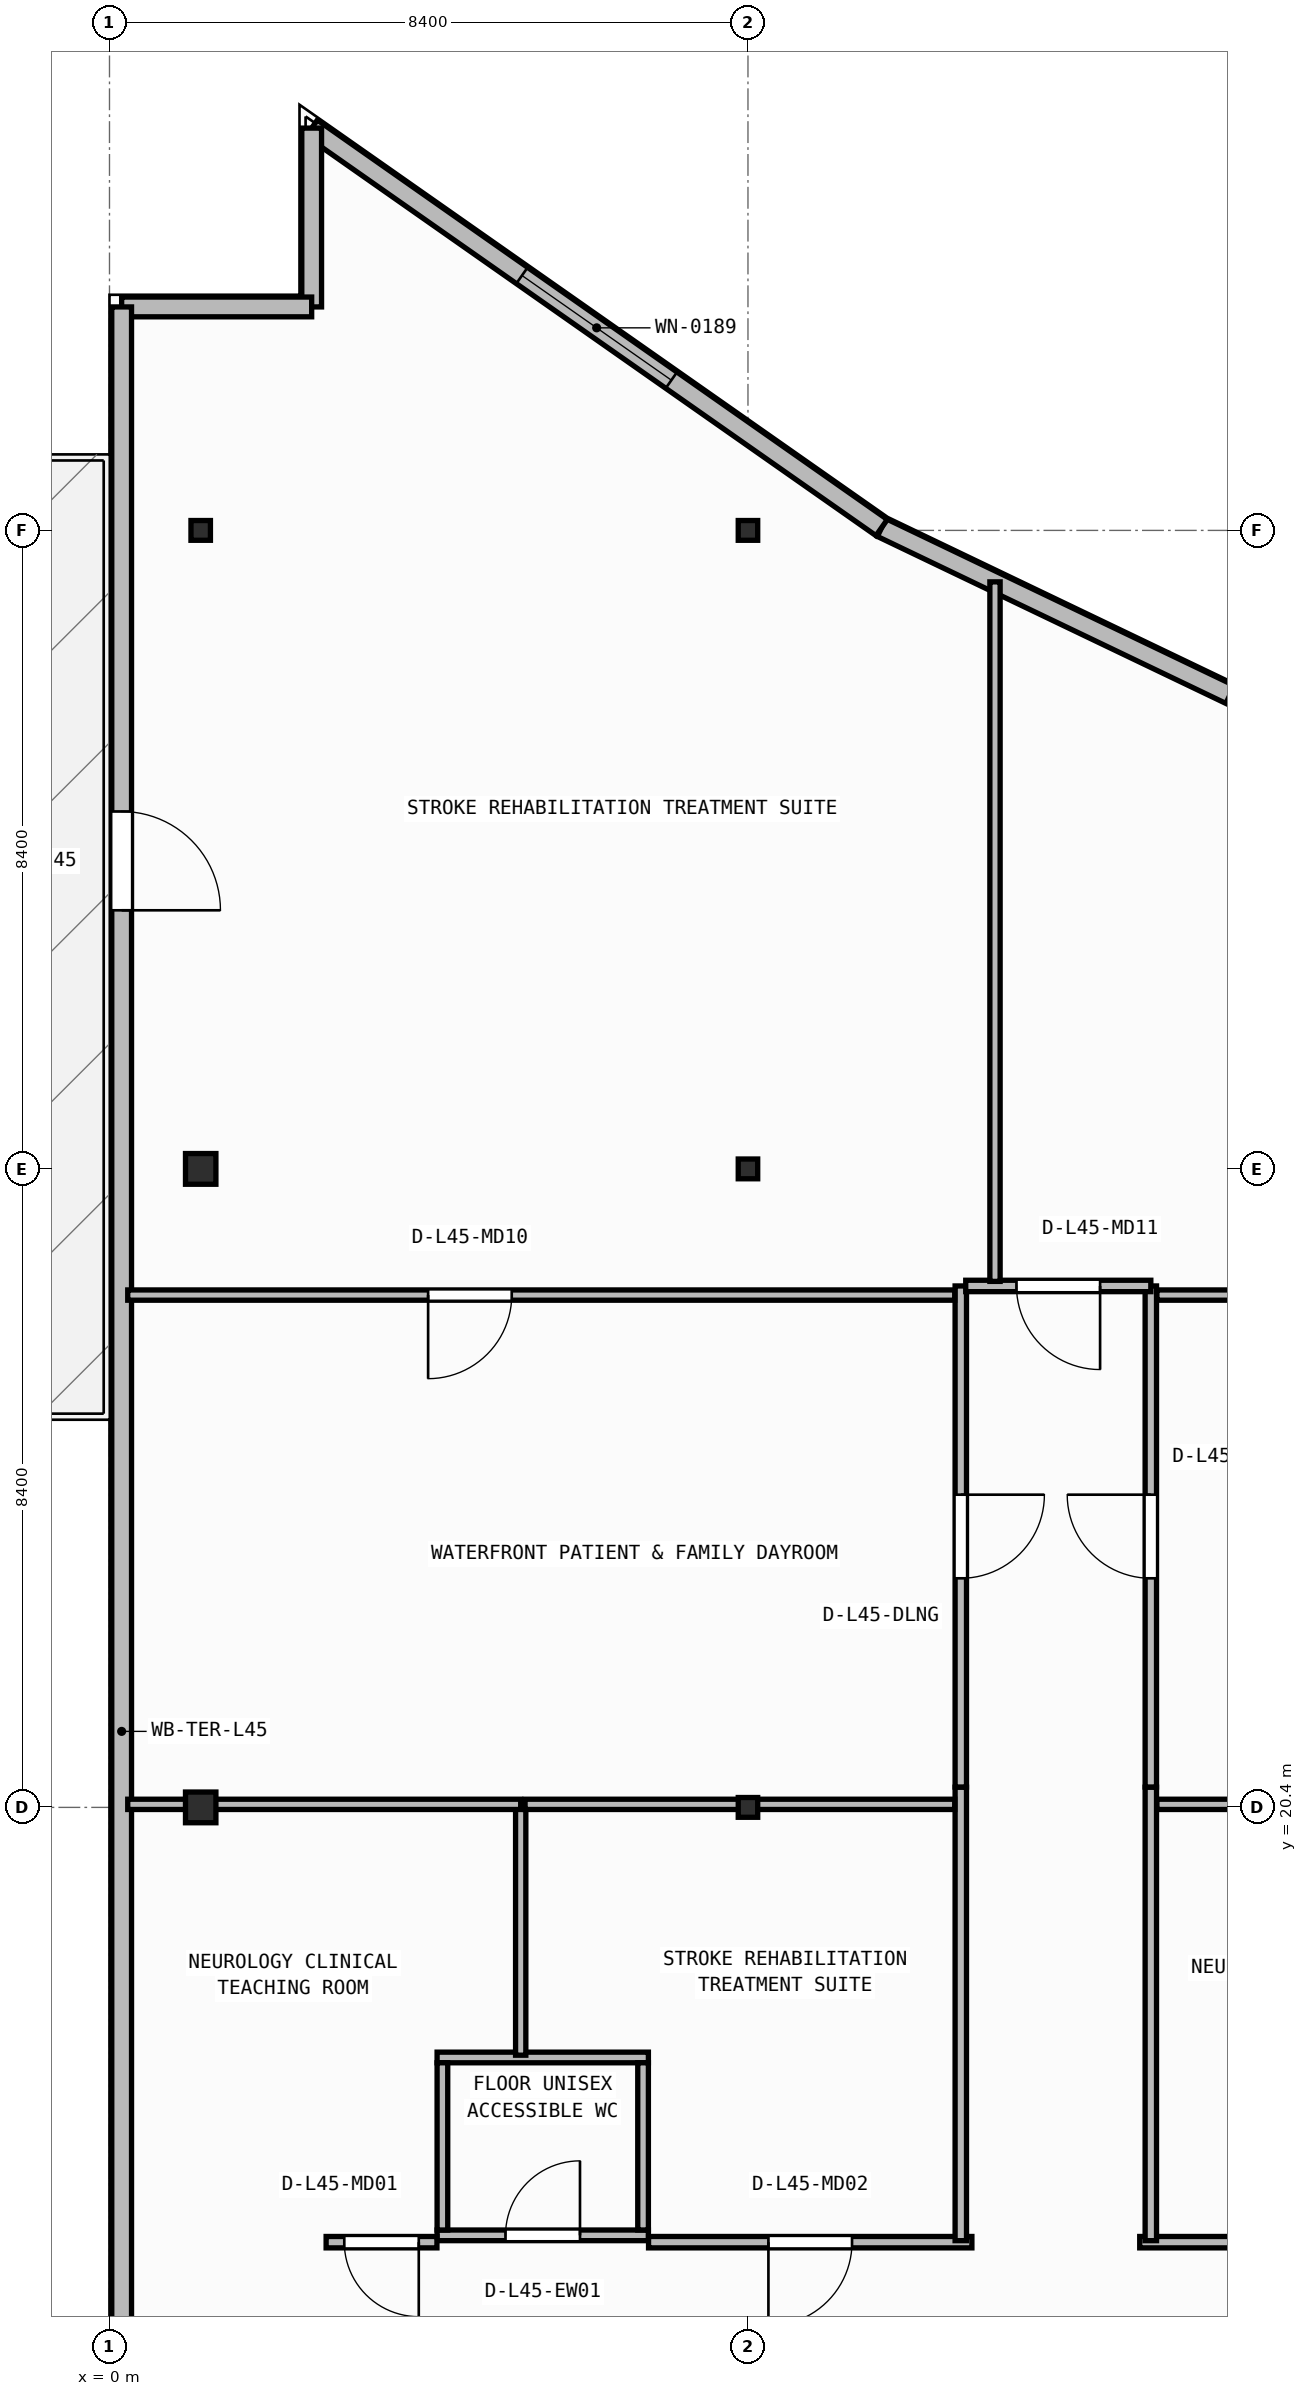
"""IFC4 building model, lengths in metres.
Left out: names, types, materials, properties, quantities, classifications, styles, units other than length and angle.
Written with IfcOpenShell. Run it as: python <this file> out.ifc"""

import sys

from ifc_helpers import new_model, si_unit, direction, frame, frame_2d, origin, origin_2d, place, context, subcontext, project, spatial, rectangle, i_section, extrude, element, fill, save


model = new_model("IFC4")
c1 = context("Model", 3, precision=1e-05, world=origin(), true_north=direction((0.0, 1.0)))
c2 = subcontext(c1, "Body", "Model", "MODEL_VIEW")
j1 = project(units=[si_unit("LENGTHUNIT", "METRE"), si_unit("PLANEANGLEUNIT", "RADIAN")], contexts=[c1])
p1 = place(None, origin())
s1 = spatial("IfcSite", under=j1, at=p1, CompositionType="ELEMENT")
p2 = place(p1, origin())
s2 = spatial("IfcBuilding", under=s1, at=p2, CompositionType="ELEMENT")
p3 = place(p2, frame((0.0, 0.0, 184.2)))
s3 = spatial("IfcBuildingStorey", under=s2, at=p3, CompositionType="ELEMENT", Elevation=184.2)
p4 = place(p3, frame((1.2, 20.4, 0.0), z_axis=(0.0, 0.0, 1.0), x_axis=(1.0, 0.0, 0.0)))
e1 = element("IfcColumn", 1, at=p4, inside=s3, PredefinedType="COLUMN", context=c2, shape_type="SweptSolid", body=[
    extrude(i_section(OverallWidth=0.4, OverallDepth=0.404, WebThickness=0.02, FlangeThickness=0.032, at=origin_2d()), origin(), (0.0, 0.0, 1.0), 3.95),
])
p5 = place(p3, frame((8.4, 20.4, 0.0), z_axis=(0.0, 0.0, 1.0), x_axis=(1.0, 0.0, 0.0)))
e2 = element("IfcColumn", 2, at=p5, inside=s3, PredefinedType="COLUMN", context=c2, shape_type="SweptSolid", body=[
    extrude(i_section(OverallWidth=0.256, OverallDepth=0.26, WebThickness=0.01, FlangeThickness=0.017, FilletRadius=0.013, at=origin_2d()), origin(), (0.0, 0.0, 1.0), 3.95),
])
p6 = place(p3, frame((1.2, 28.8, 0.0), z_axis=(0.0, 0.0, 1.0), x_axis=(1.0, 0.0, 0.0)))
e3 = element("IfcColumn", 3, at=p6, inside=s3, PredefinedType="COLUMN", context=c2, shape_type="SweptSolid", body=[
    extrude(i_section(OverallWidth=0.4, OverallDepth=0.404, WebThickness=0.02, FlangeThickness=0.032, at=origin_2d()), origin(), (0.0, 0.0, 1.0), 3.95),
])
for number, where, z_axis, x_axis in (
    (4, (8.4, 28.8, 0.0), (0.0, 0.0, 1.0), (1.0, 0.0, 0.0)),
    (5, (1.2, 37.2, 0.0), (0.0, 0.0, 1.0), (1.0, 0.0, 0.0)),
    (6, (8.4, 37.2, 0.0), (0.0, 0.0, 1.0), (1.0, 0.0, 0.0)),
):
    element("IfcColumn", number, at=place(p3, frame(where, z_axis=z_axis, x_axis=x_axis)), inside=s3, PredefinedType="COLUMN", context=c2, shape_type="SweptSolid", body=[
        extrude(i_section(OverallWidth=0.256, OverallDepth=0.26, WebThickness=0.01, FlangeThickness=0.017, FilletRadius=0.013, at=origin_2d()), origin(), (0.0, 0.0, 1.0), 3.95),
    ])
p7 = place(p3, frame((21.461, 31.823, 0.0), z_axis=(0.0, 0.0, 1.0), x_axis=(-0.901858094827, 0.432032379336, 0.0)))
e7 = element("IfcWall", 7, at=p7, inside=s3, PredefinedType="STANDARD", context=c2, shape_type="SweptSolid", body=[
    extrude(rectangle(XDim=12.532, YDim=0.26, at=frame_2d((6.266, 0.0))), origin(), (0.0, 0.0, 1.0), 3.71),
])
p8 = place(p7, frame((5.066, 0.0, 0.9)))
e8 = element("IfcOpeningElement", 8, at=p8, cuts=e7, PredefinedType="OPENING", context=c2, shape_type="SweptSolid", body=[
    extrude(rectangle(XDim=2.4, YDim=1.65, at=frame_2d((1.2, 0.825))), frame((0.0, 0.14, 0.0), z_axis=(0.0, -1.0, 0.0), x_axis=(1.0, 0.0, 0.0)), (0.0, 0.0, 1.0), 0.28),
])
p9 = place(p3, frame((10.159, 37.237, 0.0), z_axis=(0.0, 0.0, 1.0), x_axis=(-0.818933702389, 0.57388813465, 0.0)))
e9 = element("IfcWall", 9, at=p9, inside=s3, PredefinedType="STANDARD", context=c2, shape_type="SweptSolid", body=[
    extrude(rectangle(XDim=9.157, YDim=0.26, at=frame_2d((4.579, 0.0))), origin(), (0.0, 0.0, 1.0), 3.71),
])
p10 = place(p9, frame((3.378, 0.0, 0.9)))
e10 = element("IfcOpeningElement", 10, at=p10, cuts=e9, PredefinedType="OPENING", context=c2, shape_type="SweptSolid", body=[
    extrude(rectangle(XDim=2.4, YDim=1.65, at=frame_2d((1.2, 0.825))), frame((0.0, 0.14, 0.0), z_axis=(0.0, -1.0, 0.0), x_axis=(1.0, 0.0, 0.0)), (0.0, 0.0, 1.0), 0.28),
])
p11 = place(p3, frame((2.66, 42.492, 0.0), z_axis=(0.0, 0.0, 1.0), x_axis=(0.0, -1.0, 0.0)))
e11 = element("IfcWall", 11, at=p11, inside=s3, PredefinedType="STANDARD", context=c2, shape_type="SweptSolid", body=[
    extrude(rectangle(XDim=2.353, YDim=0.26, at=frame_2d((1.176, 0.0))), origin(), (0.0, 0.0, 1.0), 3.71),
])
p12 = place(p3, frame((2.66, 40.14, 0.0), z_axis=(0.0, 0.0, 1.0), x_axis=(-1.0, 0.0, 0.0)))
e12 = element("IfcWall", 12, at=p12, inside=s3, PredefinedType="STANDARD", context=c2, shape_type="SweptSolid", body=[
    extrude(rectangle(XDim=2.5, YDim=0.26, at=frame_2d((1.25, 0.0))), origin(), (0.0, 0.0, 1.0), 3.71),
])
p13 = place(p3, frame((0.16, 40.14, 0.0), z_axis=(0.0, 0.0, 1.0), x_axis=(0.0, -1.0, 0.0)))
e13 = element("IfcWall", 13, at=p13, inside=s3, PredefinedType="STANDARD", context=c2, shape_type="SweptSolid", body=[
    extrude(rectangle(XDim=37.48, YDim=0.26, at=frame_2d((18.74, 0.0))), origin(), (0.0, 0.0, 1.0), 3.71),
])
p14 = place(p13, frame((6.638, 0.0, 0.0)))
e14 = element("IfcOpeningElement", 14, at=p14, cuts=e13, PredefinedType="OPENING", context=c2, shape_type="SweptSolid", body=[
    extrude(rectangle(XDim=1.3, YDim=2.15, at=frame_2d((0.65, 1.075))), frame((0.0, 0.14, 0.0), z_axis=(0.0, -1.0, 0.0), x_axis=(1.0, 0.0, 0.0)), (0.0, 0.0, 1.0), 0.28),
])
p15 = place(p3, frame((4.31, 14.77, 0.0), z_axis=(0.0, 0.0, 1.0), x_axis=(1.0, 0.0, 0.0)))
e15 = element("IfcWall", 15, at=p15, inside=s3, PredefinedType="PARTITIONING", context=c2, shape_type="SweptSolid", body=[
    extrude(rectangle(XDim=2.78, YDim=0.14, at=frame_2d((1.39, 0.0))), origin(), (0.0, 0.0, 1.0), 3.71),
])
p16 = place(p15, frame((0.9, 0.0, 0.0)))
e16 = element("IfcOpeningElement", 16, at=p16, cuts=e15, PredefinedType="OPENING", context=c2, shape_type="SweptSolid", body=[
    extrude(rectangle(XDim=0.98, YDim=2.1, at=frame_2d((0.49, 1.05))), frame((0.0, 0.08, 0.0), z_axis=(0.0, -1.0, 0.0), x_axis=(1.0, 0.0, 0.0)), (0.0, 0.0, 1.0), 0.16),
])
p17 = place(p3, frame((4.31, 17.11, 0.0), z_axis=(0.0, 0.0, 1.0), x_axis=(1.0, 0.0, 0.0)))
e17 = element("IfcWall", 17, at=p17, inside=s3, PredefinedType="PARTITIONING", context=c2, shape_type="SweptSolid", body=[
    extrude(rectangle(XDim=2.78, YDim=0.14, at=frame_2d((1.39, 0.0))), origin(), (0.0, 0.0, 1.0), 3.71),
])
for number, where, z_axis, x_axis in (
    (18, (4.38, 14.84, 0.0), (0.0, 0.0, 1.0), (0.0, 1.0, 0.0)),
    (19, (7.02, 14.84, 0.0), (0.0, 0.0, 1.0), (0.0, 1.0, 0.0)),
):
    element("IfcWall", number, at=place(p3, frame(where, z_axis=z_axis, x_axis=x_axis)), inside=s3, PredefinedType="PARTITIONING", context=c2, shape_type="SweptSolid", body=[
        extrude(rectangle(XDim=2.2, YDim=0.14, at=frame_2d((1.1, 0.0))), origin(), (0.0, 0.0, 1.0), 3.71),
    ])
p18 = place(p3, frame((4.308, 14.68, 0.0), z_axis=(0.0, 0.0, 1.0), x_axis=(-1.0, 0.0, 0.0)))
e20 = element("IfcWall", 20, at=p18, inside=s3, PredefinedType="PARTITIONING", context=c2, shape_type="SweptSolid", body=[
    extrude(rectangle(XDim=1.458, YDim=0.15, at=frame_2d((0.729, 0.0))), origin(), (0.0, 0.0, 1.0), 3.71),
])
p19 = place(p18, frame((0.239, 0.0, 0.0)))
e21 = element("IfcOpeningElement", 21, at=p19, cuts=e20, PredefinedType="OPENING", context=c2, shape_type="SweptSolid", body=[
    extrude(rectangle(XDim=0.98, YDim=2.1, at=frame_2d((0.49, 1.05))), frame((0.0, 0.085, 0.0), z_axis=(0.0, -1.0, 0.0), x_axis=(1.0, 0.0, 0.0)), (0.0, 0.0, 1.0), 0.17),
])
p20 = place(p3, frame((11.346, 14.68, 0.0), z_axis=(0.0, 0.0, 1.0), x_axis=(-1.0, 0.0, 0.0)))
e22 = element("IfcWall", 22, at=p20, inside=s3, PredefinedType="PARTITIONING", context=c2, shape_type="SweptSolid", body=[
    extrude(rectangle(XDim=4.254, YDim=0.15, at=frame_2d((2.127, 0.0))), origin(), (0.0, 0.0, 1.0), 3.71),
])
p21 = place(p20, frame((1.577, 0.0, 0.0)))
e23 = element("IfcOpeningElement", 23, at=p21, cuts=e22, PredefinedType="OPENING", context=c2, shape_type="SweptSolid", body=[
    extrude(rectangle(XDim=1.1, YDim=2.1, at=frame_2d((0.55, 1.05))), frame((0.0, 0.085, 0.0), z_axis=(0.0, -1.0, 0.0), x_axis=(1.0, 0.0, 0.0)), (0.0, 0.0, 1.0), 0.17),
])
p22 = place(p3, frame((18.266, 14.68, 0.0), z_axis=(0.0, 0.0, 1.0), x_axis=(-1.0, 0.0, 0.0)))
e24 = element("IfcWall", 24, at=p22, inside=s3, PredefinedType="PARTITIONING", context=c2, shape_type="SweptSolid", body=[
    extrude(rectangle(XDim=4.712, YDim=0.15, at=frame_2d((2.356, 0.0))), origin(), (0.0, 0.0, 1.0), 3.71),
])
p23 = place(p22, frame((1.806, 0.0, 0.0)))
e25 = element("IfcOpeningElement", 25, at=p23, cuts=e24, PredefinedType="OPENING", context=c2, shape_type="SweptSolid", body=[
    extrude(rectangle(XDim=1.1, YDim=2.1, at=frame_2d((0.55, 1.05))), frame((0.0, 0.085, 0.0), z_axis=(0.0, -1.0, 0.0), x_axis=(1.0, 0.0, 0.0)), (0.0, 0.0, 1.0), 0.17),
])
for number, where, z_axis, x_axis in (
    (26, (11.2, 20.666, 0.0), (0.0, 0.0, 1.0), (0.0, -1.0, 0.0)),
    (27, (13.7, 14.7, 0.0), (0.0, 0.0, 1.0), (0.0, 1.0, 0.0)),
):
    element("IfcWall", number, at=place(p3, frame(where, z_axis=z_axis, x_axis=x_axis)), inside=s3, PredefinedType="PARTITIONING", context=c2, shape_type="SweptSolid", body=[
        extrude(rectangle(XDim=5.966, YDim=0.15, at=frame_2d((2.983, 0.0))), origin(), (0.0, 0.0, 1.0), 3.71),
    ])
p24 = place(p3, frame((11.2, 27.26, 0.0), z_axis=(0.0, 0.0, 1.0), x_axis=(0.0, -1.0, 0.0)))
e28 = element("IfcWall", 28, at=p24, inside=s3, PredefinedType="PARTITIONING", context=c2, shape_type="SweptSolid", body=[
    extrude(rectangle(XDim=6.592, YDim=0.15, at=frame_2d((3.296, 0.0))), origin(), (0.0, 0.0, 1.0), 3.71),
])
p25 = place(p24, frame((2.746, 0.0, 0.0)))
e29 = element("IfcOpeningElement", 29, at=p25, cuts=e28, PredefinedType="OPENING", context=c2, shape_type="SweptSolid", body=[
    extrude(rectangle(XDim=1.1, YDim=2.1, at=frame_2d((0.55, 1.05))), frame((0.0, 0.085, 0.0), z_axis=(0.0, -1.0, 0.0), x_axis=(1.0, 0.0, 0.0)), (0.0, 0.0, 1.0), 0.17),
])
p26 = place(p3, frame((13.7, 20.668, 0.0), z_axis=(0.0, 0.0, 1.0), x_axis=(0.0, 1.0, 0.0)))
e30 = element("IfcWall", 30, at=p26, inside=s3, PredefinedType="PARTITIONING", context=c2, shape_type="SweptSolid", body=[
    extrude(rectangle(XDim=6.592, YDim=0.15, at=frame_2d((3.296, 0.0))), origin(), (0.0, 0.0, 1.0), 3.71),
])
p27 = place(p26, frame((2.746, 0.0, 0.0)))
e31 = element("IfcOpeningElement", 31, at=p27, cuts=e30, PredefinedType="OPENING", context=c2, shape_type="SweptSolid", body=[
    extrude(rectangle(XDim=1.1, YDim=2.1, at=frame_2d((0.55, 1.05))), frame((0.0, 0.085, 0.0), z_axis=(0.0, -1.0, 0.0), x_axis=(1.0, 0.0, 0.0)), (0.0, 0.0, 1.0), 0.17),
])
p28 = place(p3, frame((13.7, 27.26, 0.0), z_axis=(0.0, 0.0, 1.0), x_axis=(-1.0, 0.0, 0.0)))
e32 = element("IfcWall", 32, at=p28, inside=s3, PredefinedType="PARTITIONING", context=c2, shape_type="SweptSolid", body=[
    extrude(rectangle(XDim=2.435, YDim=0.15, at=frame_2d((1.218, 0.0))), origin(), (0.0, 0.0, 1.0), 3.71),
])
p29 = place(p28, frame((0.667, 0.0, 0.0)))
e33 = element("IfcOpeningElement", 33, at=p29, cuts=e32, PredefinedType="OPENING", context=c2, shape_type="SweptSolid", body=[
    extrude(rectangle(XDim=1.1, YDim=2.1, at=frame_2d((0.55, 1.05))), frame((0.0, 0.085, 0.0), z_axis=(0.0, -1.0, 0.0), x_axis=(1.0, 0.0, 0.0)), (0.0, 0.0, 1.0), 0.17),
])
p30 = place(p3, frame((5.41, 17.14, 0.0), z_axis=(0.0, 0.0, 1.0), x_axis=(0.0, 1.0, 0.0)))
e34 = element("IfcWall", 34, at=p30, inside=s3, PredefinedType="PARTITIONING", context=c2, shape_type="SweptSolid", body=[
    extrude(rectangle(XDim=3.3, YDim=0.135, at=frame_2d((1.65, 0.0))), origin(), (0.0, 0.0, 1.0), 3.71),
])
p31 = place(p3, frame((5.41, 20.44, 0.0), z_axis=(0.0, 0.0, 1.0), x_axis=(-1.0, 0.0, 0.0)))
e35 = element("IfcWall", 35, at=p31, inside=s3, PredefinedType="PARTITIONING", context=c2, shape_type="SweptSolid", body=[
    extrude(rectangle(XDim=5.17, YDim=0.135, at=frame_2d((2.585, 0.0))), origin(), (0.0, 0.0, 1.0), 3.152),
])
p32 = place(p3, frame((11.12, 20.44, 0.0), z_axis=(0.0, 0.0, 1.0), x_axis=(-1.0, 0.0, 0.0)))
e36 = element("IfcWall", 36, at=p32, inside=s3, PredefinedType="PARTITIONING", context=c2, shape_type="SweptSolid", body=[
    extrude(rectangle(XDim=5.653, YDim=0.135, at=frame_2d((2.826, 0.0))), origin(), (0.0, 0.0, 1.0), 3.152),
])
p33 = place(p3, frame((18.04, 20.44, 0.0), z_axis=(0.0, 0.0, 1.0), x_axis=(-1.0, 0.0, 0.0)))
e37 = element("IfcWall", 37, at=p33, inside=s3, PredefinedType="PARTITIONING", context=c2, shape_type="SweptSolid", body=[
    extrude(rectangle(XDim=4.26, YDim=0.135, at=frame_2d((2.13, 0.0))), origin(), (0.0, 0.0, 1.0), 3.152),
])
p34 = place(p3, frame((11.12, 27.14, 0.0), z_axis=(0.0, 0.0, 1.0), x_axis=(-1.0, 0.0, 0.0)))
e38 = element("IfcWall", 38, at=p34, inside=s3, PredefinedType="PARTITIONING", context=c2, shape_type="SweptSolid", body=[
    extrude(rectangle(XDim=10.88, YDim=0.135, at=frame_2d((5.44, 0.0))), origin(), (0.0, 0.0, 1.0), 3.71),
])
p35 = place(p34, frame((5.828, 0.0, 0.0)))
e39 = element("IfcOpeningElement", 39, at=p35, cuts=e38, PredefinedType="OPENING", context=c2, shape_type="SweptSolid", body=[
    extrude(rectangle(XDim=1.1, YDim=2.1, at=frame_2d((0.55, 1.05))), frame((0.0, 0.077, 0.0), z_axis=(0.0, -1.0, 0.0), x_axis=(1.0, 0.0, 0.0)), (0.0, 0.0, 1.0), 0.155),
])
p36 = place(p3, frame((25.748, 27.14, 0.0), z_axis=(0.0, 0.0, 1.0), x_axis=(-1.0, 0.0, 0.0)))
e40 = element("IfcWall", 40, at=p36, inside=s3, PredefinedType="PARTITIONING", context=c2, shape_type="SweptSolid", body=[
    extrude(rectangle(XDim=11.968, YDim=0.135, at=frame_2d((5.984, 0.0))), origin(), (0.0, 0.0, 1.0), 3.71),
])
p37 = place(p3, frame((11.65, 27.32, 0.0), z_axis=(0.0, 0.0, 1.0), x_axis=(0.0, 1.0, 0.0)))
e41 = element("IfcWall", 41, at=p37, inside=s3, PredefinedType="PARTITIONING", context=c2, shape_type="SweptSolid", body=[
    extrude(rectangle(XDim=9.203, YDim=0.135, at=frame_2d((4.602, 0.0))), origin(), (0.0, 0.0, 1.0), 3.71),
])
p38 = place(p10, origin())
e42 = element("IfcWindow", 42, at=p38, inside=s3, PartitioningType="SINGLE_PANEL", PredefinedType="WINDOW", context=c2, shape_type="SweptSolid", body=[
    extrude(rectangle(XDim=2.4, YDim=1.65, at=frame_2d((1.2, 0.825))), frame((0.0, 0.03, 0.0), z_axis=(0.0, -1.0, 0.0), x_axis=(1.0, 0.0, 0.0)), (0.0, 0.0, 1.0), 0.06),
])
fill(e10, e42)
p39 = place(p14, origin())
e43 = element("IfcDoor", 43, at=p39, inside=s3, OperationType="SINGLE_SWING_RIGHT", PredefinedType="DOOR", context=c2, shape_type="SweptSolid", body=[
    extrude(rectangle(XDim=1.3, YDim=2.15, at=frame_2d((0.65, 1.075))), frame((0.0, 0.025, 0.0), z_axis=(0.0, -1.0, 0.0), x_axis=(1.0, 0.0, 0.0)), (0.0, 0.0, 1.0), 0.05),
])
fill(e14, e43)
p40 = place(p16, origin())
e44 = element("IfcDoor", 44, at=p40, inside=s3, OperationType="SINGLE_SWING_RIGHT", PredefinedType="DOOR", context=c2, shape_type="SweptSolid", body=[
    extrude(rectangle(XDim=0.98, YDim=2.1, at=frame_2d((0.49, 1.05))), frame((0.0, 0.025, 0.0), z_axis=(0.0, -1.0, 0.0), x_axis=(1.0, 0.0, 0.0)), (0.0, 0.0, 1.0), 0.05),
])
fill(e16, e44)
p41 = place(p19, origin())
e45 = element("IfcDoor", 45, at=p41, inside=s3, OperationType="SINGLE_SWING_LEFT", PredefinedType="DOOR", context=c2, shape_type="SweptSolid", body=[
    extrude(rectangle(XDim=0.98, YDim=2.1, at=frame_2d((0.49, 1.05))), frame((0.0, 0.025, 0.0), z_axis=(0.0, -1.0, 0.0), x_axis=(1.0, 0.0, 0.0)), (0.0, 0.0, 1.0), 0.05),
])
fill(e21, e45)
p42 = place(p21, origin())
e46 = element("IfcDoor", 46, at=p42, inside=s3, OperationType="SINGLE_SWING_RIGHT", PredefinedType="DOOR", context=c2, shape_type="SweptSolid", body=[
    extrude(rectangle(XDim=1.1, YDim=2.1, at=frame_2d((0.55, 1.05))), frame((0.0, 0.025, 0.0), z_axis=(0.0, -1.0, 0.0), x_axis=(1.0, 0.0, 0.0)), (0.0, 0.0, 1.0), 0.05),
])
fill(e23, e46)
p43 = place(p25, origin())
e47 = element("IfcDoor", 47, at=p43, inside=s3, OperationType="SINGLE_SWING_LEFT", PredefinedType="DOOR", context=c2, shape_type="SweptSolid", body=[
    extrude(rectangle(XDim=1.1, YDim=2.1, at=frame_2d((0.55, 1.05))), frame((0.0, 0.025, 0.0), z_axis=(0.0, -1.0, 0.0), x_axis=(1.0, 0.0, 0.0)), (0.0, 0.0, 1.0), 0.05),
])
fill(e29, e47)
p44 = place(p27, origin())
e48 = element("IfcDoor", 48, at=p44, inside=s3, OperationType="SINGLE_SWING_RIGHT", PredefinedType="DOOR", context=c2, shape_type="SweptSolid", body=[
    extrude(rectangle(XDim=1.1, YDim=2.1, at=frame_2d((0.55, 1.05))), frame((0.0, 0.025, 0.0), z_axis=(0.0, -1.0, 0.0), x_axis=(1.0, 0.0, 0.0)), (0.0, 0.0, 1.0), 0.05),
])
fill(e31, e48)
p45 = place(p29, origin())
e49 = element("IfcDoor", 49, at=p45, inside=s3, OperationType="SINGLE_SWING_LEFT", PredefinedType="DOOR", context=c2, shape_type="SweptSolid", body=[
    extrude(rectangle(XDim=1.1, YDim=2.1, at=frame_2d((0.55, 1.05))), frame((0.0, 0.025, 0.0), z_axis=(0.0, -1.0, 0.0), x_axis=(1.0, 0.0, 0.0)), (0.0, 0.0, 1.0), 0.05),
])
fill(e33, e49)
p46 = place(p35, origin())
e50 = element("IfcDoor", 50, at=p46, inside=s3, OperationType="SINGLE_SWING_RIGHT", PredefinedType="DOOR", context=c2, shape_type="SweptSolid", body=[
    extrude(rectangle(XDim=1.1, YDim=2.1, at=frame_2d((0.55, 1.05))), frame((0.0, 0.025, 0.0), z_axis=(0.0, -1.0, 0.0), x_axis=(1.0, 0.0, 0.0)), (0.0, 0.0, 1.0), 0.05),
])
fill(e39, e50)
save(model, sys.argv[1])
